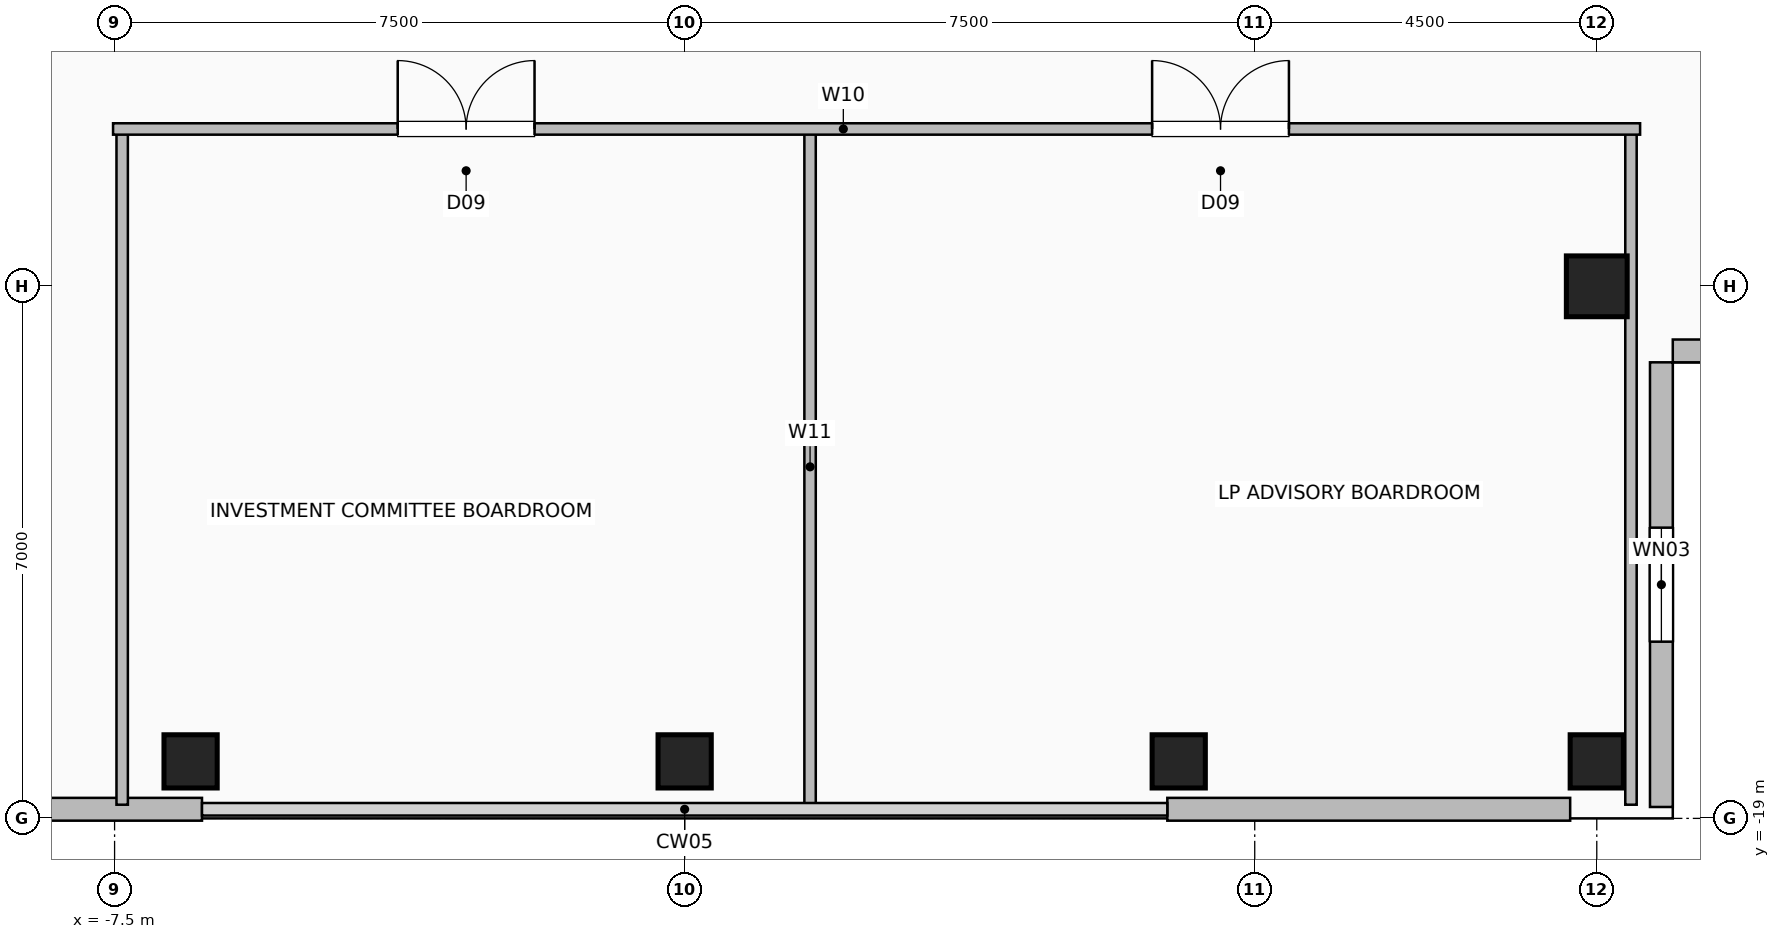
"""IFC4 building model, lengths in metres.
Left out: names, types, materials, properties, quantities, classifications, styles, units other than length and angle.
Written with IfcOpenShell. Run it as: python <this file> out.ifc"""

import sys

from ifc_helpers import new_model, si_unit, direction, frame, frame_2d, origin, origin_2d, place, context, subcontext, project, spatial, rectangle, hollow_rectangle, extrude, element, fill, save


model = new_model("IFC4")
c1 = context("Model", 3, precision=1e-05, world=origin(), true_north=direction((0.0, 1.0)))
c2 = subcontext(c1, "Body", "Model", "MODEL_VIEW")
j1 = project(units=[si_unit("LENGTHUNIT", "METRE"), si_unit("PLANEANGLEUNIT", "RADIAN")], contexts=[c1])
p1 = place(None, origin())
s1 = spatial("IfcSite", under=j1, at=p1, CompositionType="ELEMENT")
p2 = place(p1, origin())
s2 = spatial("IfcBuilding", under=s1, at=p2, CompositionType="ELEMENT")
p3 = place(p2, frame((0.0, 0.0, 279.2)))
s3 = spatial("IfcBuildingStorey", under=s2, at=p3, CompositionType="ELEMENT", Elevation=279.2)
for number, where, z_axis, x_axis in (
    (1, (-6.5, -18.25, 0.0), (0.0, 0.0, 1.0), (1.0, 0.0, 0.0)),
    (2, (0.0, -18.25, 0.0), (0.0, 0.0, 1.0), (1.0, 0.0, 0.0)),
    (3, (6.5, -18.25, 0.0), (0.0, 0.0, 1.0), (1.0, 0.0, 0.0)),
    (4, (12.0, -18.25, 0.0), (0.0, 0.0, 1.0), (1.0, 0.0, 0.0)),
):
    element("IfcColumn", number, at=place(p3, frame(where, z_axis=z_axis, x_axis=x_axis)), inside=s3, PredefinedType="COLUMN", context=c2, shape_type="SweptSolid", body=[
        extrude(hollow_rectangle(XDim=0.7, YDim=0.7, WallThickness=0.035, at=origin_2d()), origin(), (0.0, 0.0, 1.0), 3.6),
    ])
p4 = place(p3, frame((12.0, -12.0, 0.0), z_axis=(0.0, 0.0, 1.0), x_axis=(1.0, 0.0, 0.0)))
e5 = element("IfcColumn", 5, at=p4, inside=s3, PredefinedType="COLUMN", context=c2, shape_type="SweptSolid", body=[
    extrude(hollow_rectangle(XDim=0.8, YDim=0.8, WallThickness=0.04, at=origin_2d()), origin(), (0.0, 0.0, 1.0), 3.6),
])
for number, where, z_axis, x_axis in (
    (6, (-11.65, -18.88, 0.0), (0.0, 0.0, 1.0), (1.0, 0.0, 0.0)),
    (7, (6.35, -18.88, 0.0), (0.0, 0.0, 1.0), (1.0, 0.0, 0.0)),
):
    element("IfcWall", number, at=place(p3, frame(where, z_axis=z_axis, x_axis=x_axis)), inside=s3, PredefinedType="SOLIDWALL", context=c2, shape_type="SweptSolid", body=[
        extrude(rectangle(XDim=5.3, YDim=0.3, at=frame_2d((2.65, 0.0))), origin(), (0.0, 0.0, 1.0), 3.36),
    ])
p5 = place(p3, frame((12.85, -18.85, 0.0), z_axis=(0.0, 0.0, 1.0), x_axis=(0.0, 1.0, 0.0)))
e8 = element("IfcWall", 8, at=p5, inside=s3, PredefinedType="SOLIDWALL", context=c2, shape_type="SweptSolid", body=[
    extrude(rectangle(XDim=5.85, YDim=0.3, at=frame_2d((2.925, 0.0))), origin(), (0.0, 0.0, 1.0), 3.36),
])
p6 = place(p5, frame((2.175, 0.0, 0.9)))
e9 = element("IfcOpeningElement", 9, at=p6, cuts=e8, PredefinedType="OPENING", context=c2, shape_type="SweptSolid", body=[
    extrude(rectangle(XDim=1.5, YDim=1.8, at=frame_2d((0.75, 0.9))), frame((0.0, 0.16, 0.0), z_axis=(0.0, -1.0, 0.0), x_axis=(1.0, 0.0, 0.0)), (0.0, 0.0, 1.0), 0.32),
])
p7 = place(p3, frame((18.85, -12.85, 0.0), z_axis=(0.0, 0.0, 1.0), x_axis=(-1.0, 0.0, 0.0)))
e10 = element("IfcWall", 10, at=p7, inside=s3, PredefinedType="SOLIDWALL", context=c2, shape_type="SweptSolid", body=[
    extrude(rectangle(XDim=5.85, YDim=0.3, at=frame_2d((2.925, 0.0))), origin(), (0.0, 0.0, 1.0), 3.36),
])
for number, where, z_axis, x_axis in (
    (11, (-7.4, -18.82, 0.0), (0.0, 0.0, 1.0), (0.0, 1.0, 0.0)),
    (12, (1.65, -18.82, 0.0), (0.0, 0.0, 1.0), (0.0, 1.0, 0.0)),
    (13, (12.45, -18.82, 0.0), (0.0, 0.0, 1.0), (0.0, 1.0, 0.0)),
):
    element("IfcWall", number, at=place(p3, frame(where, z_axis=z_axis, x_axis=x_axis)), inside=s3, PredefinedType="PARTITIONING", context=c2, shape_type="SweptSolid", body=[
        extrude(rectangle(XDim=8.89, YDim=0.15, at=frame_2d((4.445, 0.0))), origin(), (0.0, 0.0, 1.0), 3.36),
    ])
p8 = place(p3, frame((-7.52, -9.93, 0.0), z_axis=(0.0, 0.0, 1.0), x_axis=(1.0, 0.0, 0.0)))
e14 = element("IfcWall", 14, at=p8, inside=s3, PredefinedType="PARTITIONING", context=c2, shape_type="SweptSolid", body=[
    extrude(rectangle(XDim=20.09, YDim=0.15, at=frame_2d((10.045, 0.0))), origin(), (0.0, 0.0, 1.0), 3.36),
])
p9 = place(p8, frame((3.745, 0.0, 0.0)))
e15 = element("IfcOpeningElement", 15, at=p9, cuts=e14, PredefinedType="OPENING", context=c2, shape_type="SweptSolid", body=[
    extrude(rectangle(XDim=1.8, YDim=2.08, at=frame_2d((0.9, 1.04))), frame((0.0, 0.085, 0.0), z_axis=(0.0, -1.0, 0.0), x_axis=(1.0, 0.0, 0.0)), (0.0, 0.0, 1.0), 0.17),
])
p10 = place(p8, frame((13.67, 0.0, 0.0)))
e16 = element("IfcOpeningElement", 16, at=p10, cuts=e14, PredefinedType="OPENING", context=c2, shape_type="SweptSolid", body=[
    extrude(rectangle(XDim=1.8, YDim=2.08, at=frame_2d((0.9, 1.04))), frame((0.0, 0.085, 0.0), z_axis=(0.0, -1.0, 0.0), x_axis=(1.0, 0.0, 0.0)), (0.0, 0.0, 1.0), 0.17),
])
p11 = place(p6, origin())
e17 = element("IfcWindow", 17, at=p11, inside=s3, PartitioningType="SINGLE_PANEL", PredefinedType="WINDOW", context=c2, shape_type="SweptSolid", body=[
    extrude(rectangle(XDim=1.5, YDim=1.8, at=frame_2d((0.75, 0.9))), frame((0.0, 0.03, 0.0), z_axis=(0.0, -1.0, 0.0), x_axis=(1.0, 0.0, 0.0)), (0.0, 0.0, 1.0), 0.06),
])
fill(e9, e17)
p12 = place(p9, origin())
e18 = element("IfcDoor", 18, at=p12, inside=s3, OperationType="DOUBLE_DOOR_SINGLE_SWING", PredefinedType="DOOR", context=c2, shape_type="SweptSolid", body=[
    extrude(rectangle(XDim=1.8, YDim=2.08, at=frame_2d((0.9, 1.04))), frame((0.0, 0.025, 0.0), z_axis=(0.0, -1.0, 0.0), x_axis=(1.0, 0.0, 0.0)), (0.0, 0.0, 1.0), 0.05),
])
fill(e15, e18)
p13 = place(p10, origin())
e19 = element("IfcDoor", 19, at=p13, inside=s3, OperationType="DOUBLE_DOOR_SINGLE_SWING", PredefinedType="DOOR", context=c2, shape_type="SweptSolid", body=[
    extrude(rectangle(XDim=1.8, YDim=2.08, at=frame_2d((0.9, 1.04))), frame((0.0, 0.025, 0.0), z_axis=(0.0, -1.0, 0.0), x_axis=(1.0, 0.0, 0.0)), (0.0, 0.0, 1.0), 0.05),
])
fill(e16, e19)
save(model, sys.argv[1])
